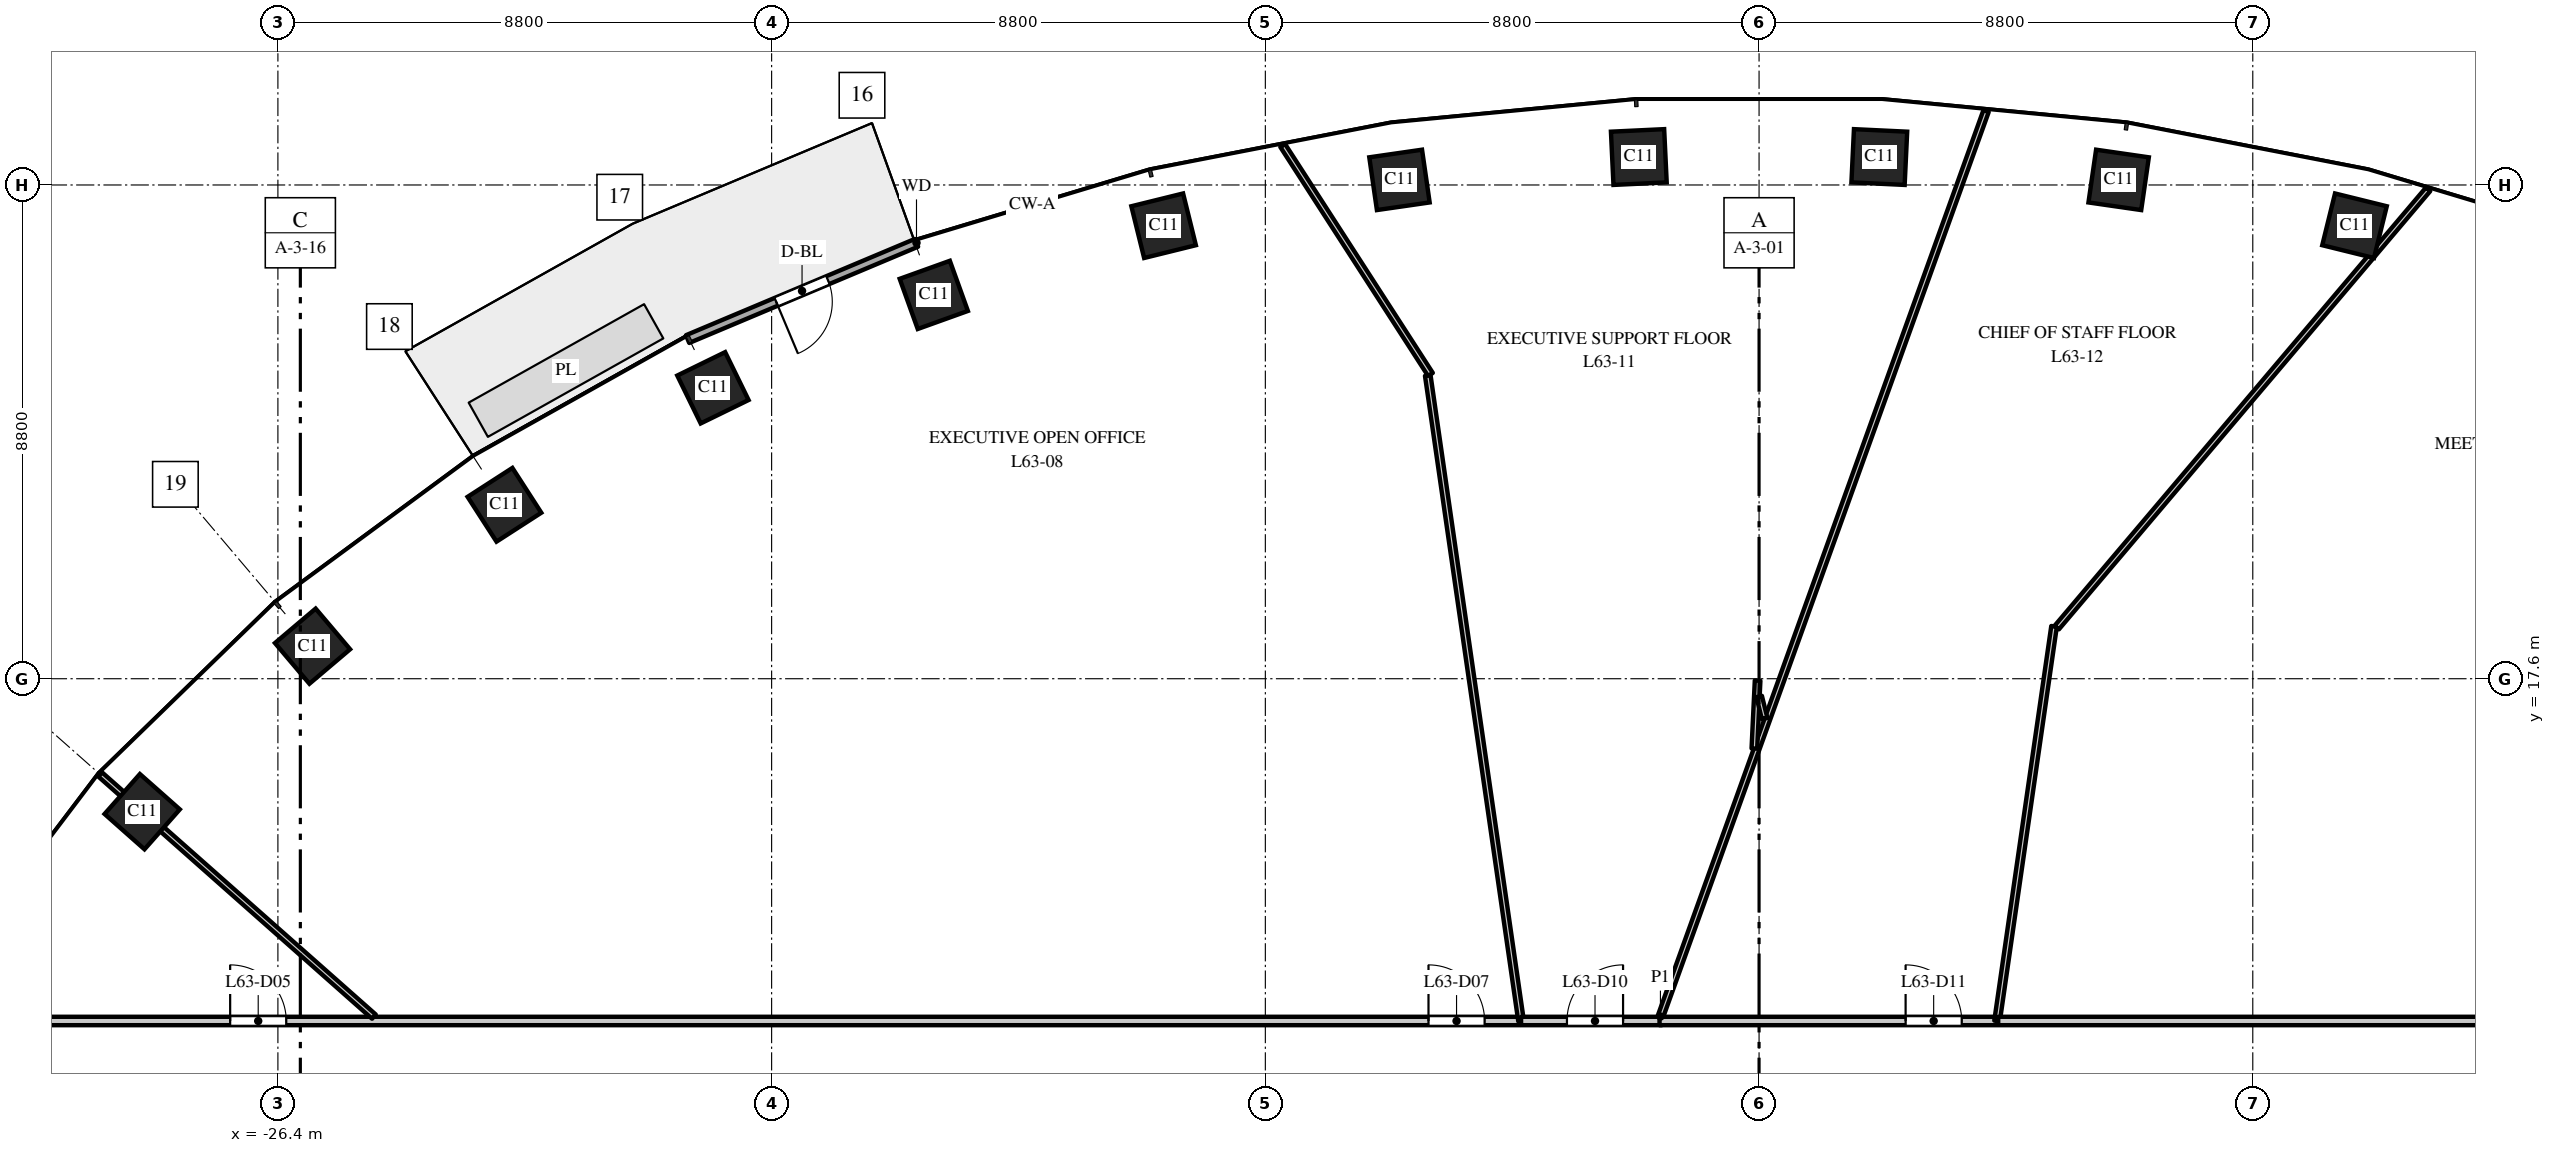
"""IFC4 building model, lengths in metres.
Left out: names, types, materials, properties, quantities, classifications, styles, units other than length and angle.
Written with IfcOpenShell. Run it as: python <this file> out.ifc"""

import sys

from ifc_helpers import new_model, si_unit, direction, frame, frame_2d, origin, origin_2d, place, context, subcontext, project, spatial, rectangle, extrude, element, fill, save


model = new_model("IFC4")
c1 = context("Model", 3, precision=1e-05, world=origin(), true_north=direction((0.0, 1.0)))
c2 = subcontext(c1, "Body", "Model", "MODEL_VIEW")
j1 = project(units=[si_unit("LENGTHUNIT", "METRE"), si_unit("PLANEANGLEUNIT", "RADIAN")], contexts=[c1])
p1 = place(None, origin())
s1 = spatial("IfcSite", under=j1, at=p1, CompositionType="ELEMENT")
p2 = place(p1, origin())
s2 = spatial("IfcBuilding", under=s1, at=p2, CompositionType="ELEMENT")
p3 = place(p2, frame((0.0, 0.0, 295.0)))
s3 = spatial("IfcBuildingStorey", under=s2, at=p3, CompositionType="ELEMENT", Elevation=295.0)
for number, where, z_axis, x_axis in (
    (1, (10.613, 25.674, 0.0), (0.0, 0.0, 1.0), (-0.971, 0.24, 0.0)),
    (2, (6.409, 26.491, 0.0), (0.0, 0.0, 1.0), (-0.99, 0.143, 0.0)),
    (3, (2.143, 26.898, 0.0), (0.0, 0.0, 1.0), (-0.999, 0.048, 0.0)),
    (4, (-2.143, 26.898, 0.0), (0.0, 0.0, 1.0), (-0.999, -0.048, 0.0)),
    (5, (-6.409, 26.491, 0.0), (0.0, 0.0, 1.0), (-0.99, -0.143, 0.0)),
    (6, (-10.613, 25.674, 0.0), (0.0, 0.0, 1.0), (-0.971, -0.24, 0.0)),
    (7, (-14.709, 24.441, 0.0), (0.0, 0.0, 1.0), (-0.941, -0.338, 0.0)),
    (8, (-18.646, 22.785, 0.0), (0.0, 0.0, 1.0), (-0.898, -0.439, 0.0)),
    (9, (-22.362, 20.7, 0.0), (0.0, 0.0, 1.0), (-0.84, -0.542, 0.0)),
    (10, (-25.783, 18.18, 0.0), (0.0, 0.0, 1.0), (-0.763, -0.646, 0.0)),
    (11, (-28.819, 15.23, 0.0), (0.0, 0.0, 1.0), (-0.663, -0.749, 0.0)),
):
    element("IfcColumn", number, at=place(p3, frame(where, z_axis=z_axis, x_axis=x_axis)), inside=s3, PredefinedType="COLUMN", context=c2, shape_type="SweptSolid", body=[
        extrude(rectangle(XDim=0.95, YDim=0.95, at=origin_2d()), origin(), (0.0, 0.0, 1.0), 4.0),
    ])
p4 = place(p3, frame((-15.018, 25.369, 0.0), z_axis=(0.0, 0.0, 1.0), x_axis=(-0.921816985161, -0.387625393736, 0.0)))
e12 = element("IfcWall", 12, at=p4, inside=s3, PredefinedType="STANDARD", context=c2, shape_type="SweptSolid", body=[
    extrude(rectangle(XDim=4.426, YDim=0.15, at=frame_2d((2.213, 0.0))), origin(), (0.0, 0.0, 1.0), 3.7),
])
p5 = place(p4, frame((1.713, 0.0, 0.0)))
e13 = element("IfcOpeningElement", 13, at=p5, cuts=e12, PredefinedType="OPENING", context=c2, shape_type="SweptSolid", body=[
    extrude(rectangle(XDim=1.0, YDim=2.4, at=frame_2d((0.5, 1.2))), frame((0.0, 0.085, 0.0), z_axis=(0.0, -1.0, 0.0), x_axis=(1.0, 0.0, 0.0)), (0.0, 0.0, 1.0), 0.17),
])
p6 = place(p3, frame((-31.5, 11.5, 0.0), z_axis=(0.0, 0.0, 1.0), x_axis=(1.0, 0.0, 0.0)))
e14 = element("IfcWall", 14, at=p6, inside=s3, PredefinedType="PARTITIONING", context=c2, shape_type="SweptSolid", body=[
    extrude(rectangle(XDim=27.238, YDim=0.15, at=frame_2d((13.619, 0.0))), origin(), (0.0, 0.0, 1.0), 2.75),
])
p7 = place(p6, frame((4.249, 0.0, 0.0)))
e15 = element("IfcOpeningElement", 15, at=p7, cuts=e14, PredefinedType="OPENING", context=c2, shape_type="SweptSolid", body=[
    extrude(rectangle(XDim=1.0, YDim=2.1, at=frame_2d((0.5, 1.05))), frame((0.0, 0.085, 0.0), z_axis=(0.0, -1.0, 0.0), x_axis=(1.0, 0.0, 0.0)), (0.0, 0.0, 1.0), 0.17),
])
p8 = place(p6, frame((25.608, 0.0, 0.0)))
e16 = element("IfcOpeningElement", 16, at=p8, cuts=e14, PredefinedType="OPENING", context=c2, shape_type="SweptSolid", body=[
    extrude(rectangle(XDim=1.0, YDim=2.1, at=frame_2d((0.5, 1.05))), frame((0.0, 0.085, 0.0), z_axis=(0.0, -1.0, 0.0), x_axis=(1.0, 0.0, 0.0)), (0.0, 0.0, 1.0), 0.17),
])
p9 = place(p3, frame((-29.569, 15.895, 0.0), z_axis=(0.0, 0.0, 1.0), x_axis=(0.748988695283, -0.662582775461, 0.0)))
e17 = element("IfcWall", 17, at=p9, inside=s3, PredefinedType="PARTITIONING", context=c2, shape_type="SweptSolid", body=[
    extrude(rectangle(XDim=6.516, YDim=0.1, at=frame_2d((3.258, 0.0))), origin(), (0.0, 0.0, 1.0), 3.0),
])
p10 = place(p3, frame((-8.491, 27.104, 0.0), z_axis=(0.0, 0.0, 1.0), x_axis=(0.542285995048, -0.840193965448, 0.0)))
e18 = element("IfcWall", 18, at=p10, inside=s3, PredefinedType="PARTITIONING", context=c2, shape_type="SweptSolid", body=[
    extrude(rectangle(XDim=4.857, YDim=0.1, at=frame_2d((2.429, 0.0))), origin(), (0.0, 0.0, 1.0), 3.0),
])
p11 = place(p3, frame((-5.905, 23.005, 0.0), z_axis=(0.0, 0.0, 1.0), x_axis=(0.143067741786, -0.989712898401, 0.0)))
e19 = element("IfcWall", 19, at=p11, inside=s3, PredefinedType="PARTITIONING", context=c2, shape_type="SweptSolid", body=[
    extrude(rectangle(XDim=11.625, YDim=0.1, at=frame_2d((5.812, 0.0))), origin(), (0.0, 0.0, 1.0), 3.7),
])
p12 = place(p3, frame((-4.242, 11.5, 0.0), z_axis=(0.0, 0.0, 1.0), x_axis=(1.0, 0.0, 0.0)))
e20 = element("IfcWall", 20, at=p12, inside=s3, PredefinedType="PARTITIONING", context=c2, shape_type="SweptSolid", body=[
    extrude(rectangle(XDim=2.51, YDim=0.15, at=frame_2d((1.255, 0.0))), origin(), (0.0, 0.0, 1.0), 3.7),
])
p13 = place(p12, frame((0.818, 0.0, 0.0)))
e21 = element("IfcOpeningElement", 21, at=p13, cuts=e20, PredefinedType="OPENING", context=c2, shape_type="SweptSolid", body=[
    extrude(rectangle(XDim=1.0, YDim=2.1, at=frame_2d((0.5, 1.05))), frame((0.0, 0.085, 0.0), z_axis=(0.0, -1.0, 0.0), x_axis=(1.0, 0.0, 0.0)), (0.0, 0.0, 1.0), 0.17),
])
p14 = place(p3, frame((-1.758, 11.579, 0.0), z_axis=(0.0, 0.0, 1.0), x_axis=(0.338425059236, 0.940993347097, 0.0)))
e22 = element("IfcWall", 22, at=p14, inside=s3, PredefinedType="PARTITIONING", context=c2, shape_type="SweptSolid", body=[
    extrude(rectangle(XDim=17.15, YDim=0.1, at=frame_2d((8.575, 0.0))), origin(), (0.0, 0.0, 1.0), 2.85),
])
p15 = place(p3, frame((-1.774, 11.5, 0.0), z_axis=(0.0, 0.0, 1.0), x_axis=(1.0, 0.0, 0.0)))
e23 = element("IfcWall", 23, at=p15, inside=s3, PredefinedType="PARTITIONING", context=c2, shape_type="SweptSolid", body=[
    extrude(rectangle(XDim=6.016, YDim=0.15, at=frame_2d((3.008, 0.0))), origin(), (0.0, 0.0, 1.0), 2.85),
])
p16 = place(p15, frame((4.386, 0.0, 0.0)))
e24 = element("IfcOpeningElement", 24, at=p16, cuts=e23, PredefinedType="OPENING", context=c2, shape_type="SweptSolid", body=[
    extrude(rectangle(XDim=1.0, YDim=2.1, at=frame_2d((0.5, 1.05))), frame((0.0, 0.085, 0.0), z_axis=(0.0, -1.0, 0.0), x_axis=(1.0, 0.0, 0.0)), (0.0, 0.0, 1.0), 0.17),
])
p17 = place(p3, frame((-0.084, 16.356, 0.0), z_axis=(0.0, 0.0, 1.0), x_axis=(0.047967320325, 0.998848905581, 0.0)))
e25 = element("IfcWall", 25, at=p17, inside=s3, PredefinedType="PARTITIONING", context=c2, shape_type="SweptSolid", body=[
    extrude(rectangle(XDim=1.211, YDim=0.1, at=frame_2d((0.606, 0.0))), origin(), (0.0, 0.0, 1.0), 3.7),
])
p18 = place(p3, frame((0.002, 17.284, 0.0), z_axis=(0.0, 0.0, 1.0), x_axis=(0.240121592304, -0.970742819139, 0.0)))
e26 = element("IfcWall", 26, at=p18, inside=s3, PredefinedType="PARTITIONING", context=c2, shape_type="SweptSolid", body=[
    extrude(rectangle(XDim=0.405, YDim=0.1, at=frame_2d((0.202, 0.0))), origin(), (0.0, 0.0, 1.0), 3.7),
])
p19 = place(p3, frame((4.242, 11.5, 0.0), z_axis=(0.0, 0.0, 1.0), x_axis=(0.1429940435, 0.98972354904, 0.0)))
e27 = element("IfcWall", 27, at=p19, inside=s3, PredefinedType="PARTITIONING", context=c2, shape_type="SweptSolid", body=[
    extrude(rectangle(XDim=7.106, YDim=0.1, at=frame_2d((3.553, 0.0))), origin(), (0.0, 0.0, 1.0), 3.7),
])
p20 = place(p3, frame((4.262, 11.5, 0.0), z_axis=(0.0, 0.0, 1.0), x_axis=(1.0, 0.0, 0.0)))
e28 = element("IfcWall", 28, at=p20, inside=s3, PredefinedType="PARTITIONING", context=c2, shape_type="SweptSolid", body=[
    extrude(rectangle(XDim=27.238, YDim=0.15, at=frame_2d((13.619, 0.0))), origin(), (0.0, 0.0, 1.0), 2.75),
])
p21 = place(p20, frame((18.694, 0.0, 0.0)))
e29 = element("IfcOpeningElement", 29, at=p21, cuts=e28, PredefinedType="OPENING", context=c2, shape_type="SweptSolid", body=[
    extrude(rectangle(XDim=1.0, YDim=2.1, at=frame_2d((0.5, 1.05))), frame((0.0, 0.085, 0.0), z_axis=(0.0, -1.0, 0.0), x_axis=(1.0, 0.0, 0.0)), (0.0, 0.0, 1.0), 0.17),
])
p22 = place(p20, frame((22.088, 0.0, 0.0)))
e30 = element("IfcOpeningElement", 30, at=p22, cuts=e28, PredefinedType="OPENING", context=c2, shape_type="SweptSolid", body=[
    extrude(rectangle(XDim=1.0, YDim=2.1, at=frame_2d((0.5, 1.05))), frame((0.0, 0.085, 0.0), z_axis=(0.0, -1.0, 0.0), x_axis=(1.0, 0.0, 0.0)), (0.0, 0.0, 1.0), 0.17),
])
p23 = place(p3, frame((5.306, 18.512, 0.0), z_axis=(0.0, 0.0, 1.0), x_axis=(0.646500054355, 0.762913939917, 0.0)))
e31 = element("IfcWall", 31, at=p23, inside=s3, PredefinedType="PARTITIONING", context=c2, shape_type="SweptSolid", body=[
    extrude(rectangle(XDim=10.239, YDim=0.1, at=frame_2d((5.119, 0.0))), origin(), (0.0, 0.0, 1.0), 3.0),
])
p24 = place(p5, origin())
e32 = element("IfcDoor", 32, at=p24, inside=s3, OperationType="SINGLE_SWING_RIGHT", PredefinedType="DOOR", context=c2, shape_type="SweptSolid", body=[
    extrude(rectangle(XDim=1.0, YDim=2.4, at=frame_2d((0.5, 1.2))), frame((0.0, 0.025, 0.0), z_axis=(0.0, -1.0, 0.0), x_axis=(1.0, 0.0, 0.0)), (0.0, 0.0, 1.0), 0.05),
])
fill(e13, e32)
p25 = place(p7, origin())
e33 = element("IfcDoor", 33, at=p25, inside=s3, OperationType="SINGLE_SWING_LEFT", PredefinedType="DOOR", context=c2, shape_type="SweptSolid", body=[
    extrude(rectangle(XDim=1.0, YDim=2.1, at=frame_2d((0.5, 1.05))), frame((0.0, 0.025, 0.0), z_axis=(0.0, -1.0, 0.0), x_axis=(1.0, 0.0, 0.0)), (0.0, 0.0, 1.0), 0.05),
])
fill(e15, e33)
p26 = place(p8, origin())
e34 = element("IfcDoor", 34, at=p26, inside=s3, OperationType="SINGLE_SWING_LEFT", PredefinedType="DOOR", context=c2, shape_type="SweptSolid", body=[
    extrude(rectangle(XDim=1.0, YDim=2.1, at=frame_2d((0.5, 1.05))), frame((0.0, 0.025, 0.0), z_axis=(0.0, -1.0, 0.0), x_axis=(1.0, 0.0, 0.0)), (0.0, 0.0, 1.0), 0.05),
])
fill(e16, e34)
p27 = place(p13, origin())
e35 = element("IfcDoor", 35, at=p27, inside=s3, OperationType="SINGLE_SWING_RIGHT", PredefinedType="DOOR", context=c2, shape_type="SweptSolid", body=[
    extrude(rectangle(XDim=1.0, YDim=2.1, at=frame_2d((0.5, 1.05))), frame((0.0, 0.025, 0.0), z_axis=(0.0, -1.0, 0.0), x_axis=(1.0, 0.0, 0.0)), (0.0, 0.0, 1.0), 0.05),
])
fill(e21, e35)
p28 = place(p16, origin())
e36 = element("IfcDoor", 36, at=p28, inside=s3, OperationType="SINGLE_SWING_LEFT", PredefinedType="DOOR", context=c2, shape_type="SweptSolid", body=[
    extrude(rectangle(XDim=1.0, YDim=2.1, at=frame_2d((0.5, 1.05))), frame((0.0, 0.025, 0.0), z_axis=(0.0, -1.0, 0.0), x_axis=(1.0, 0.0, 0.0)), (0.0, 0.0, 1.0), 0.05),
])
fill(e24, e36)
save(model, sys.argv[1])
